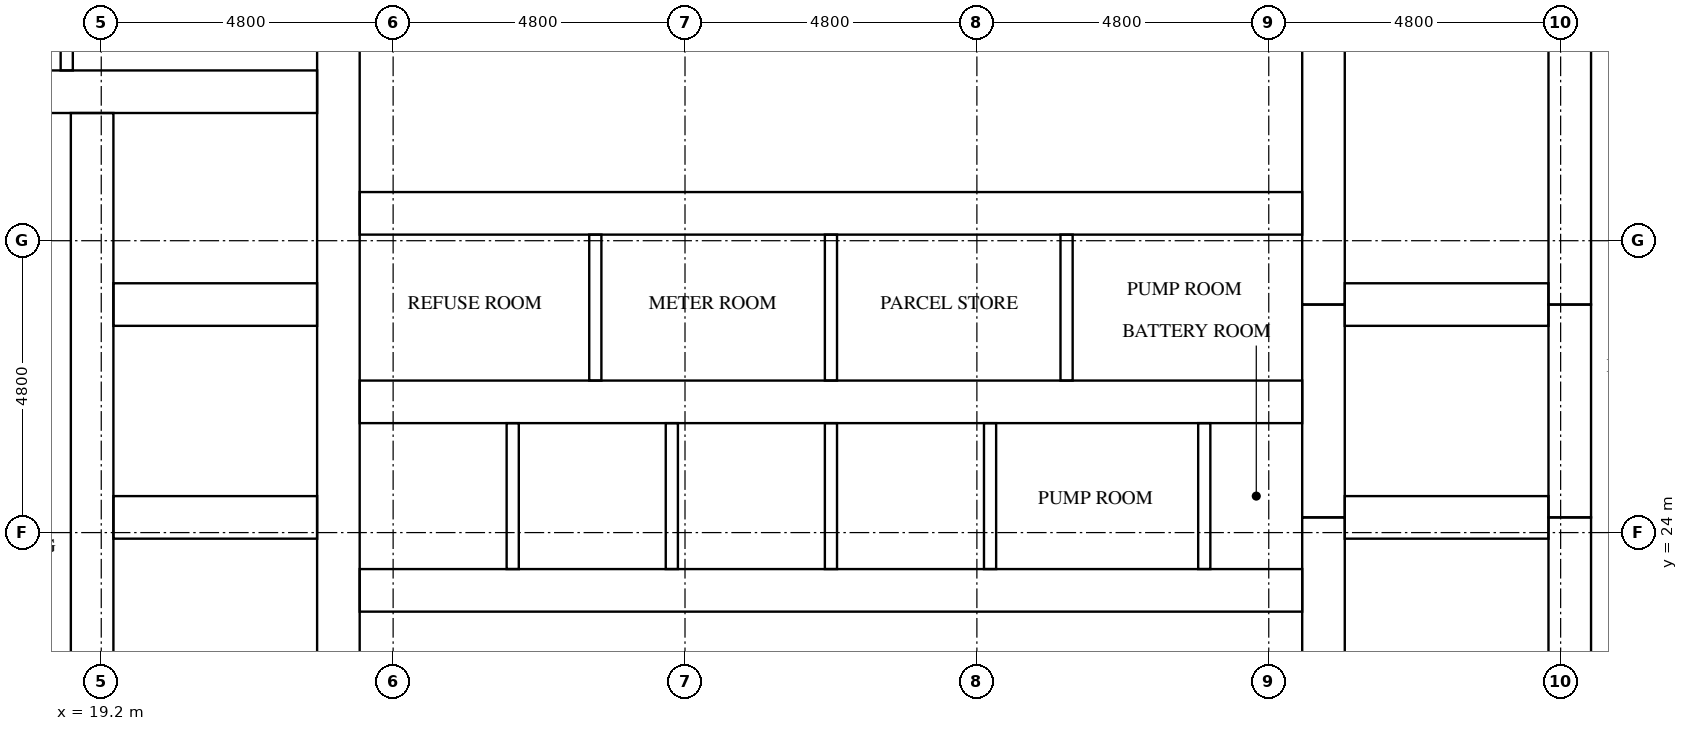
"""IFC4 building model, lengths in metres.
Left out: names, types, materials, properties, quantities, classifications, styles, units other than length and angle.
Written with IfcOpenShell. Run it as: python <this file> out.ifc"""

import sys

from ifc_helpers import new_model, si_unit, direction, frame, frame_2d, origin, place, context, subcontext, project, spatial, rectangle, extrude, element, fill, save


model = new_model("IFC4")
c1 = context("Model", 3, precision=1e-05, world=origin(), true_north=direction((0.0, 1.0)))
c2 = subcontext(c1, "Body", "Model", "MODEL_VIEW")
j1 = project(units=[si_unit("LENGTHUNIT", "METRE"), si_unit("PLANEANGLEUNIT", "RADIAN")], contexts=[c1])
p1 = place(None, origin())
s1 = spatial("IfcSite", under=j1, at=p1, CompositionType="ELEMENT")
p2 = place(p1, origin())
s2 = spatial("IfcBuilding", under=s1, at=p2, CompositionType="ELEMENT")
p3 = place(p2, frame((0.0, 0.0, 36.4)))
s3 = spatial("IfcBuildingStorey", under=s2, at=p3, CompositionType="ELEMENT", Elevation=36.4)
p4 = place(p3, frame((19.05, 16.0, 0.0), z_axis=(0.0, 0.0, 1.0), x_axis=(0.0, 1.0, 0.0)))
e1 = element("IfcWall", 1, at=p4, inside=s3, PredefinedType="SHEAR", context=c2, shape_type="SweptSolid", body=[
    extrude(rectangle(XDim=14.9, YDim=0.7, at=frame_2d((7.45, 0.0))), origin(), (0.0, 0.0, 1.0), 3.2),
])
p5 = place(p4, frame((9.45, 0.0, 0.0)))
e2 = element("IfcOpeningElement", 2, at=p5, cuts=e1, PredefinedType="OPENING", context=c2, shape_type="SweptSolid", body=[
    extrude(rectangle(XDim=1.1, YDim=2.1, at=frame_2d((0.55, 1.05))), frame((0.0, 0.36, 0.0), z_axis=(0.0, -1.0, 0.0), x_axis=(1.0, 0.0, 0.0)), (0.0, 0.0, 1.0), 0.72),
])
p6 = place(p4, frame((12.95, 0.0, 0.0)))
e3 = element("IfcOpeningElement", 3, at=p6, cuts=e1, PredefinedType="OPENING", context=c2, shape_type="SweptSolid", body=[
    extrude(rectangle(XDim=1.1, YDim=2.1, at=frame_2d((0.55, 1.05))), frame((0.0, 0.36, 0.0), z_axis=(0.0, -1.0, 0.0), x_axis=(1.0, 0.0, 0.0)), (0.0, 0.0, 1.0), 0.72),
])
p7 = place(p4, frame((0.2, 0.0, 0.0)))
e4 = element("IfcOpeningElement", 4, at=p7, cuts=e1, PredefinedType="OPENING", context=c2, shape_type="SweptSolid", body=[
    extrude(rectangle(XDim=1.2, YDim=2.1, at=frame_2d((0.6, 1.05))), frame((0.0, 0.36, 0.0), z_axis=(0.0, -1.0, 0.0), x_axis=(1.0, 0.0, 0.0)), (0.0, 0.0, 1.0), 0.72),
])
p8 = place(p3, frame((23.1, 16.0, 0.0), z_axis=(0.0, 0.0, 1.0), x_axis=(0.0, 1.0, 0.0)))
e5 = element("IfcWall", 5, at=p8, inside=s3, PredefinedType="SHEAR", context=c2, shape_type="SweptSolid", body=[
    extrude(rectangle(XDim=20.8, YDim=0.7, at=frame_2d((10.4, 0.0))), origin(), (0.0, 0.0, 1.0), 3.2),
])
p9 = place(p3, frame((39.3, 16.0, 0.0), z_axis=(0.0, 0.0, 1.0), x_axis=(0.0, 1.0, 0.0)))
e6 = element("IfcWall", 6, at=p9, inside=s3, PredefinedType="SHEAR", context=c2, shape_type="SweptSolid", body=[
    extrude(rectangle(XDim=8.25, YDim=0.7, at=frame_2d((4.125, 0.0))), origin(), (0.0, 0.0, 1.0), 3.2),
])
p10 = place(p3, frame((39.3, 24.25, 0.0), z_axis=(0.0, 0.0, 1.0), x_axis=(0.0, 1.0, 0.0)))
e7 = element("IfcWall", 7, at=p10, inside=s3, PredefinedType="SHEAR", context=c2, shape_type="SweptSolid", body=[
    extrude(rectangle(XDim=3.5, YDim=0.7, at=frame_2d((1.75, 0.0))), origin(), (0.0, 0.0, 1.0), 3.2),
])
p11 = place(p3, frame((39.3, 27.75, 0.0), z_axis=(0.0, 0.0, 1.0), x_axis=(0.0, 1.0, 0.0)))
e8 = element("IfcWall", 8, at=p11, inside=s3, PredefinedType="SHEAR", context=c2, shape_type="SweptSolid", body=[
    extrude(rectangle(XDim=9.05, YDim=0.7, at=frame_2d((4.525, 0.0))), origin(), (0.0, 0.0, 1.0), 3.2),
])
p12 = place(p3, frame((43.35, 16.0, 0.0), z_axis=(0.0, 0.0, 1.0), x_axis=(0.0, 1.0, 0.0)))
e9 = element("IfcWall", 9, at=p12, inside=s3, PredefinedType="SHEAR", context=c2, shape_type="SweptSolid", body=[
    extrude(rectangle(XDim=8.25, YDim=0.7, at=frame_2d((4.125, 0.0))), origin(), (0.0, 0.0, 1.0), 3.2),
])
p13 = place(p12, frame((0.2, 0.0, 0.0)))
e10 = element("IfcOpeningElement", 10, at=p13, cuts=e9, PredefinedType="OPENING", context=c2, shape_type="SweptSolid", body=[
    extrude(rectangle(XDim=1.2, YDim=2.1, at=frame_2d((0.6, 1.05))), frame((0.0, 0.36, 0.0), z_axis=(0.0, -1.0, 0.0), x_axis=(1.0, 0.0, 0.0)), (0.0, 0.0, 1.0), 0.72),
])
p14 = place(p3, frame((43.35, 24.25, 0.0), z_axis=(0.0, 0.0, 1.0), x_axis=(0.0, 1.0, 0.0)))
e11 = element("IfcWall", 11, at=p14, inside=s3, PredefinedType="SHEAR", context=c2, shape_type="SweptSolid", body=[
    extrude(rectangle(XDim=3.5, YDim=0.7, at=frame_2d((1.75, 0.0))), origin(), (0.0, 0.0, 1.0), 3.2),
])
p15 = place(p14, frame((1.2, 0.0, 0.0)))
e12 = element("IfcOpeningElement", 12, at=p15, cuts=e11, PredefinedType="OPENING", context=c2, shape_type="SweptSolid", body=[
    extrude(rectangle(XDim=1.1, YDim=2.1, at=frame_2d((0.55, 1.05))), frame((0.0, 0.36, 0.0), z_axis=(0.0, -1.0, 0.0), x_axis=(1.0, 0.0, 0.0)), (0.0, 0.0, 1.0), 0.72),
])
p16 = place(p3, frame((43.35, 27.75, 0.0), z_axis=(0.0, 0.0, 1.0), x_axis=(0.0, 1.0, 0.0)))
e13 = element("IfcWall", 13, at=p16, inside=s3, PredefinedType="SHEAR", context=c2, shape_type="SweptSolid", body=[
    extrude(rectangle(XDim=9.05, YDim=0.7, at=frame_2d((4.525, 0.0))), origin(), (0.0, 0.0, 1.0), 3.2),
])
p17 = place(p16, frame((7.65, 0.0, 0.0)))
e14 = element("IfcOpeningElement", 14, at=p17, cuts=e13, PredefinedType="OPENING", context=c2, shape_type="SweptSolid", body=[
    extrude(rectangle(XDim=1.2, YDim=2.1, at=frame_2d((0.6, 1.05))), frame((0.0, 0.36, 0.0), z_axis=(0.0, -1.0, 0.0), x_axis=(1.0, 0.0, 0.0)), (0.0, 0.0, 1.0), 0.72),
])
for number, where, z_axis, x_axis in (
    (15, (19.4, 24.25, 0.0), (0.0, 0.0, 1.0), (1.0, 0.0, 0.0)),
    (16, (19.4, 27.75, 0.0), (0.0, 0.0, 1.0), (1.0, 0.0, 0.0)),
):
    element("IfcWall", number, at=place(p3, frame(where, z_axis=z_axis, x_axis=x_axis)), inside=s3, PredefinedType="SHEAR", context=c2, shape_type="SweptSolid", body=[
        extrude(rectangle(XDim=3.35, YDim=0.7, at=frame_2d((1.675, 0.0))), origin(), (0.0, 0.0, 1.0), 3.2),
    ])
p18 = place(p3, frame((16.0, 31.25, 0.0), z_axis=(0.0, 0.0, 1.0), x_axis=(1.0, 0.0, 0.0)))
e17 = element("IfcWall", 17, at=p18, inside=s3, PredefinedType="SHEAR", context=c2, shape_type="SweptSolid", body=[
    extrude(rectangle(XDim=6.75, YDim=0.7, at=frame_2d((3.375, 0.0))), origin(), (0.0, 0.0, 1.0), 3.2),
])
for number, where, z_axis, x_axis in (
    (18, (39.65, 24.25, 0.0), (0.0, 0.0, 1.0), (1.0, 0.0, 0.0)),
    (19, (39.65, 27.75, 0.0), (0.0, 0.0, 1.0), (1.0, 0.0, 0.0)),
):
    element("IfcWall", number, at=place(p3, frame(where, z_axis=z_axis, x_axis=x_axis)), inside=s3, PredefinedType="SHEAR", context=c2, shape_type="SweptSolid", body=[
        extrude(rectangle(XDim=3.35, YDim=0.7, at=frame_2d((1.675, 0.0))), origin(), (0.0, 0.0, 1.0), 3.2),
    ])
p19 = place(p3, frame((23.45, 23.05, 0.0), z_axis=(0.0, 0.0, 1.0), x_axis=(1.0, 0.0, 0.0)))
e20 = element("IfcWall", 20, at=p19, inside=s3, PredefinedType="SHEAR", context=c2, shape_type="SweptSolid", body=[
    extrude(rectangle(XDim=15.5, YDim=0.7, at=frame_2d((7.75, 0.0))), origin(), (0.0, 0.0, 1.0), 3.2),
])
p20 = place(p19, frame((0.658, 0.0, 0.0)))
e21 = element("IfcOpeningElement", 21, at=p20, cuts=e20, PredefinedType="OPENING", context=c2, shape_type="SweptSolid", body=[
    extrude(rectangle(XDim=1.1, YDim=2.1, at=frame_2d((0.55, 1.05))), frame((0.0, 0.36, 0.0), z_axis=(0.0, -1.0, 0.0), x_axis=(1.0, 0.0, 0.0)), (0.0, 0.0, 1.0), 0.72),
])
p21 = place(p19, frame((3.275, 0.0, 0.0)))
e22 = element("IfcOpeningElement", 22, at=p21, cuts=e20, PredefinedType="OPENING", context=c2, shape_type="SweptSolid", body=[
    extrude(rectangle(XDim=1.1, YDim=2.1, at=frame_2d((0.55, 1.05))), frame((0.0, 0.36, 0.0), z_axis=(0.0, -1.0, 0.0), x_axis=(1.0, 0.0, 0.0)), (0.0, 0.0, 1.0), 0.72),
])
p22 = place(p19, frame((11.628, 0.0, 0.0)))
e23 = element("IfcOpeningElement", 23, at=p22, cuts=e20, PredefinedType="OPENING", context=c2, shape_type="SweptSolid", body=[
    extrude(rectangle(XDim=1.0, YDim=2.1, at=frame_2d((0.5, 1.05))), frame((0.0, 0.36, 0.0), z_axis=(0.0, -1.0, 0.0), x_axis=(1.0, 0.0, 0.0)), (0.0, 0.0, 1.0), 0.72),
])
p23 = place(p19, frame((14.245, 0.0, 0.0)))
e24 = element("IfcOpeningElement", 24, at=p23, cuts=e20, PredefinedType="OPENING", context=c2, shape_type="SweptSolid", body=[
    extrude(rectangle(XDim=1.0, YDim=2.1, at=frame_2d((0.5, 1.05))), frame((0.0, 0.36, 0.0), z_axis=(0.0, -1.0, 0.0), x_axis=(1.0, 0.0, 0.0)), (0.0, 0.0, 1.0), 0.72),
])
p24 = place(p3, frame((23.45, 26.15, 0.0), z_axis=(0.0, 0.0, 1.0), x_axis=(1.0, 0.0, 0.0)))
e25 = element("IfcWall", 25, at=p24, inside=s3, PredefinedType="SHEAR", context=c2, shape_type="SweptSolid", body=[
    extrude(rectangle(XDim=15.5, YDim=0.7, at=frame_2d((7.75, 0.0))), origin(), (0.0, 0.0, 1.0), 3.2),
])
p25 = place(p3, frame((23.45, 29.25, 0.0), z_axis=(0.0, 0.0, 1.0), x_axis=(1.0, 0.0, 0.0)))
e26 = element("IfcWall", 26, at=p25, inside=s3, PredefinedType="SHEAR", context=c2, shape_type="SweptSolid", body=[
    extrude(rectangle(XDim=15.5, YDim=0.7, at=frame_2d((7.75, 0.0))), origin(), (0.0, 0.0, 1.0), 3.2),
])
p26 = place(p25, frame((1.387, 0.0, 0.0)))
e27 = element("IfcOpeningElement", 27, at=p26, cuts=e26, PredefinedType="OPENING", context=c2, shape_type="SweptSolid", body=[
    extrude(rectangle(XDim=1.0, YDim=2.1, at=frame_2d((0.5, 1.05))), frame((0.0, 0.36, 0.0), z_axis=(0.0, -1.0, 0.0), x_axis=(1.0, 0.0, 0.0)), (0.0, 0.0, 1.0), 0.72),
])
p27 = place(p25, frame((5.312, 0.0, 0.0)))
e28 = element("IfcOpeningElement", 28, at=p27, cuts=e26, PredefinedType="OPENING", context=c2, shape_type="SweptSolid", body=[
    extrude(rectangle(XDim=1.0, YDim=2.1, at=frame_2d((0.5, 1.05))), frame((0.0, 0.36, 0.0), z_axis=(0.0, -1.0, 0.0), x_axis=(1.0, 0.0, 0.0)), (0.0, 0.0, 1.0), 0.72),
])
p28 = place(p25, frame((9.188, 0.0, 0.0)))
e29 = element("IfcOpeningElement", 29, at=p28, cuts=e26, PredefinedType="OPENING", context=c2, shape_type="SweptSolid", body=[
    extrude(rectangle(XDim=1.0, YDim=2.1, at=frame_2d((0.5, 1.05))), frame((0.0, 0.36, 0.0), z_axis=(0.0, -1.0, 0.0), x_axis=(1.0, 0.0, 0.0)), (0.0, 0.0, 1.0), 0.72),
])
p29 = place(p25, frame((13.113, 0.0, 0.0)))
e30 = element("IfcOpeningElement", 30, at=p29, cuts=e26, PredefinedType="OPENING", context=c2, shape_type="SweptSolid", body=[
    extrude(rectangle(XDim=1.0, YDim=2.1, at=frame_2d((0.5, 1.05))), frame((0.0, 0.36, 0.0), z_axis=(0.0, -1.0, 0.0), x_axis=(1.0, 0.0, 0.0)), (0.0, 0.0, 1.0), 0.72),
])
for number, where, z_axis, x_axis in (
    (31, (25.967, 23.4, 0.0), (0.0, 0.0, 1.0), (0.0, 1.0, 0.0)),
    (32, (28.583, 23.4, 0.0), (0.0, 0.0, 1.0), (0.0, 1.0, 0.0)),
    (33, (31.2, 23.4, 0.0), (0.0, 0.0, 1.0), (0.0, 1.0, 0.0)),
    (34, (33.817, 23.4, 0.0), (0.0, 0.0, 1.0), (0.0, 1.0, 0.0)),
):
    element("IfcWall", number, at=place(p3, frame(where, z_axis=z_axis, x_axis=x_axis)), inside=s3, PredefinedType="SOLIDWALL", context=c2, shape_type="SweptSolid", body=[
        extrude(rectangle(XDim=2.4, YDim=0.2, at=frame_2d((1.2, 0.0))), origin(), (0.0, 0.0, 1.0), 3.2),
    ])
p30 = place(p3, frame((18.633, 31.6, 0.0), z_axis=(0.0, 0.0, 1.0), x_axis=(0.0, 1.0, 0.0)))
e35 = element("IfcWall", 35, at=p30, inside=s3, PredefinedType="PARTITIONING", context=c2, shape_type="SweptSolid", body=[
    extrude(rectangle(XDim=5.2, YDim=0.2, at=frame_2d((2.6, 0.0))), origin(), (0.0, 0.0, 1.0), 3.2),
])
p31 = place(p3, frame((37.339, 23.4, 0.0), z_axis=(0.0, 0.0, 1.0), x_axis=(0.0, 1.0, 0.0)))
e36 = element("IfcWall", 36, at=p31, inside=s3, PredefinedType="PARTITIONING", context=c2, shape_type="SweptSolid", body=[
    extrude(rectangle(XDim=2.4, YDim=0.2, at=frame_2d((1.2, 0.0))), origin(), (0.0, 0.0, 1.0), 3.2),
])
for number, where, z_axis, x_axis in (
    (37, (27.325, 26.5, 0.0), (0.0, 0.0, 1.0), (0.0, 1.0, 0.0)),
    (38, (31.2, 26.5, 0.0), (0.0, 0.0, 1.0), (0.0, 1.0, 0.0)),
    (39, (35.075, 26.5, 0.0), (0.0, 0.0, 1.0), (0.0, 1.0, 0.0)),
):
    element("IfcWall", number, at=place(p3, frame(where, z_axis=z_axis, x_axis=x_axis)), inside=s3, PredefinedType="PARTITIONING", context=c2, shape_type="SweptSolid", body=[
        extrude(rectangle(XDim=2.4, YDim=0.2, at=frame_2d((1.2, 0.0))), origin(), (0.0, 0.0, 1.0), 3.2),
    ])
p32 = place(p20, origin())
e40 = element("IfcDoor", 40, at=p32, inside=s3, OperationType="DOUBLE_DOOR_SLIDING", PredefinedType="DOOR", context=c2, shape_type="SweptSolid", body=[
    extrude(rectangle(XDim=1.1, YDim=2.1, at=frame_2d((0.55, 1.05))), frame((0.0, 0.025, 0.0), z_axis=(0.0, -1.0, 0.0), x_axis=(1.0, 0.0, 0.0)), (0.0, 0.0, 1.0), 0.05),
])
fill(e21, e40)
p33 = place(p21, origin())
e41 = element("IfcDoor", 41, at=p33, inside=s3, OperationType="DOUBLE_DOOR_SLIDING", PredefinedType="DOOR", context=c2, shape_type="SweptSolid", body=[
    extrude(rectangle(XDim=1.1, YDim=2.1, at=frame_2d((0.55, 1.05))), frame((0.0, 0.025, 0.0), z_axis=(0.0, -1.0, 0.0), x_axis=(1.0, 0.0, 0.0)), (0.0, 0.0, 1.0), 0.05),
])
fill(e22, e41)
p34 = place(p5, origin())
e42 = element("IfcDoor", 42, at=p34, inside=s3, OperationType="DOUBLE_DOOR_SLIDING", PredefinedType="DOOR", context=c2, shape_type="SweptSolid", body=[
    extrude(rectangle(XDim=1.1, YDim=2.1, at=frame_2d((0.55, 1.05))), frame((0.0, 0.025, 0.0), z_axis=(0.0, -1.0, 0.0), x_axis=(1.0, 0.0, 0.0)), (0.0, 0.0, 1.0), 0.05),
])
fill(e2, e42)
p35 = place(p6, origin())
e43 = element("IfcDoor", 43, at=p35, inside=s3, OperationType="DOUBLE_DOOR_SLIDING", PredefinedType="DOOR", context=c2, shape_type="SweptSolid", body=[
    extrude(rectangle(XDim=1.1, YDim=2.1, at=frame_2d((0.55, 1.05))), frame((0.0, 0.025, 0.0), z_axis=(0.0, -1.0, 0.0), x_axis=(1.0, 0.0, 0.0)), (0.0, 0.0, 1.0), 0.05),
])
fill(e3, e43)
p36 = place(p15, origin())
e44 = element("IfcDoor", 44, at=p36, inside=s3, OperationType="DOUBLE_DOOR_SLIDING", PredefinedType="DOOR", context=c2, shape_type="SweptSolid", body=[
    extrude(rectangle(XDim=1.1, YDim=2.1, at=frame_2d((0.55, 1.05))), frame((0.0, 0.025, 0.0), z_axis=(0.0, -1.0, 0.0), x_axis=(1.0, 0.0, 0.0)), (0.0, 0.0, 1.0), 0.05),
])
fill(e12, e44)
p37 = place(p22, frame((1.0, 0.0, 0.0), z_axis=(0.0, 0.0, 1.0), x_axis=(-1.0, 0.0, 0.0)))
e45 = element("IfcDoor", 45, at=p37, inside=s3, OperationType="SINGLE_SWING_LEFT", PredefinedType="DOOR", context=c2, shape_type="SweptSolid", body=[
    extrude(rectangle(XDim=1.0, YDim=2.1, at=frame_2d((0.5, 1.05))), frame((0.0, 0.025, 0.0), z_axis=(0.0, -1.0, 0.0), x_axis=(1.0, 0.0, 0.0)), (0.0, 0.0, 1.0), 0.05),
])
fill(e23, e45)
p38 = place(p23, frame((1.0, 0.0, 0.0), z_axis=(0.0, 0.0, 1.0), x_axis=(-1.0, 0.0, 0.0)))
e46 = element("IfcDoor", 46, at=p38, inside=s3, OperationType="SINGLE_SWING_RIGHT", PredefinedType="DOOR", context=c2, shape_type="SweptSolid", body=[
    extrude(rectangle(XDim=1.0, YDim=2.1, at=frame_2d((0.5, 1.05))), frame((0.0, 0.025, 0.0), z_axis=(0.0, -1.0, 0.0), x_axis=(1.0, 0.0, 0.0)), (0.0, 0.0, 1.0), 0.05),
])
fill(e24, e46)
p39 = place(p26, origin())
e47 = element("IfcDoor", 47, at=p39, inside=s3, OperationType="SINGLE_SWING_LEFT", PredefinedType="DOOR", context=c2, shape_type="SweptSolid", body=[
    extrude(rectangle(XDim=1.0, YDim=2.1, at=frame_2d((0.5, 1.05))), frame((0.0, 0.025, 0.0), z_axis=(0.0, -1.0, 0.0), x_axis=(1.0, 0.0, 0.0)), (0.0, 0.0, 1.0), 0.05),
])
fill(e27, e47)
p40 = place(p27, origin())
e48 = element("IfcDoor", 48, at=p40, inside=s3, OperationType="SINGLE_SWING_RIGHT", PredefinedType="DOOR", context=c2, shape_type="SweptSolid", body=[
    extrude(rectangle(XDim=1.0, YDim=2.1, at=frame_2d((0.5, 1.05))), frame((0.0, 0.025, 0.0), z_axis=(0.0, -1.0, 0.0), x_axis=(1.0, 0.0, 0.0)), (0.0, 0.0, 1.0), 0.05),
])
fill(e28, e48)
p41 = place(p28, origin())
e49 = element("IfcDoor", 49, at=p41, inside=s3, OperationType="SINGLE_SWING_LEFT", PredefinedType="DOOR", context=c2, shape_type="SweptSolid", body=[
    extrude(rectangle(XDim=1.0, YDim=2.1, at=frame_2d((0.5, 1.05))), frame((0.0, 0.025, 0.0), z_axis=(0.0, -1.0, 0.0), x_axis=(1.0, 0.0, 0.0)), (0.0, 0.0, 1.0), 0.05),
])
fill(e29, e49)
p42 = place(p29, origin())
e50 = element("IfcDoor", 50, at=p42, inside=s3, OperationType="SINGLE_SWING_RIGHT", PredefinedType="DOOR", context=c2, shape_type="SweptSolid", body=[
    extrude(rectangle(XDim=1.0, YDim=2.1, at=frame_2d((0.5, 1.05))), frame((0.0, 0.025, 0.0), z_axis=(0.0, -1.0, 0.0), x_axis=(1.0, 0.0, 0.0)), (0.0, 0.0, 1.0), 0.05),
])
fill(e30, e50)
save(model, sys.argv[1])
